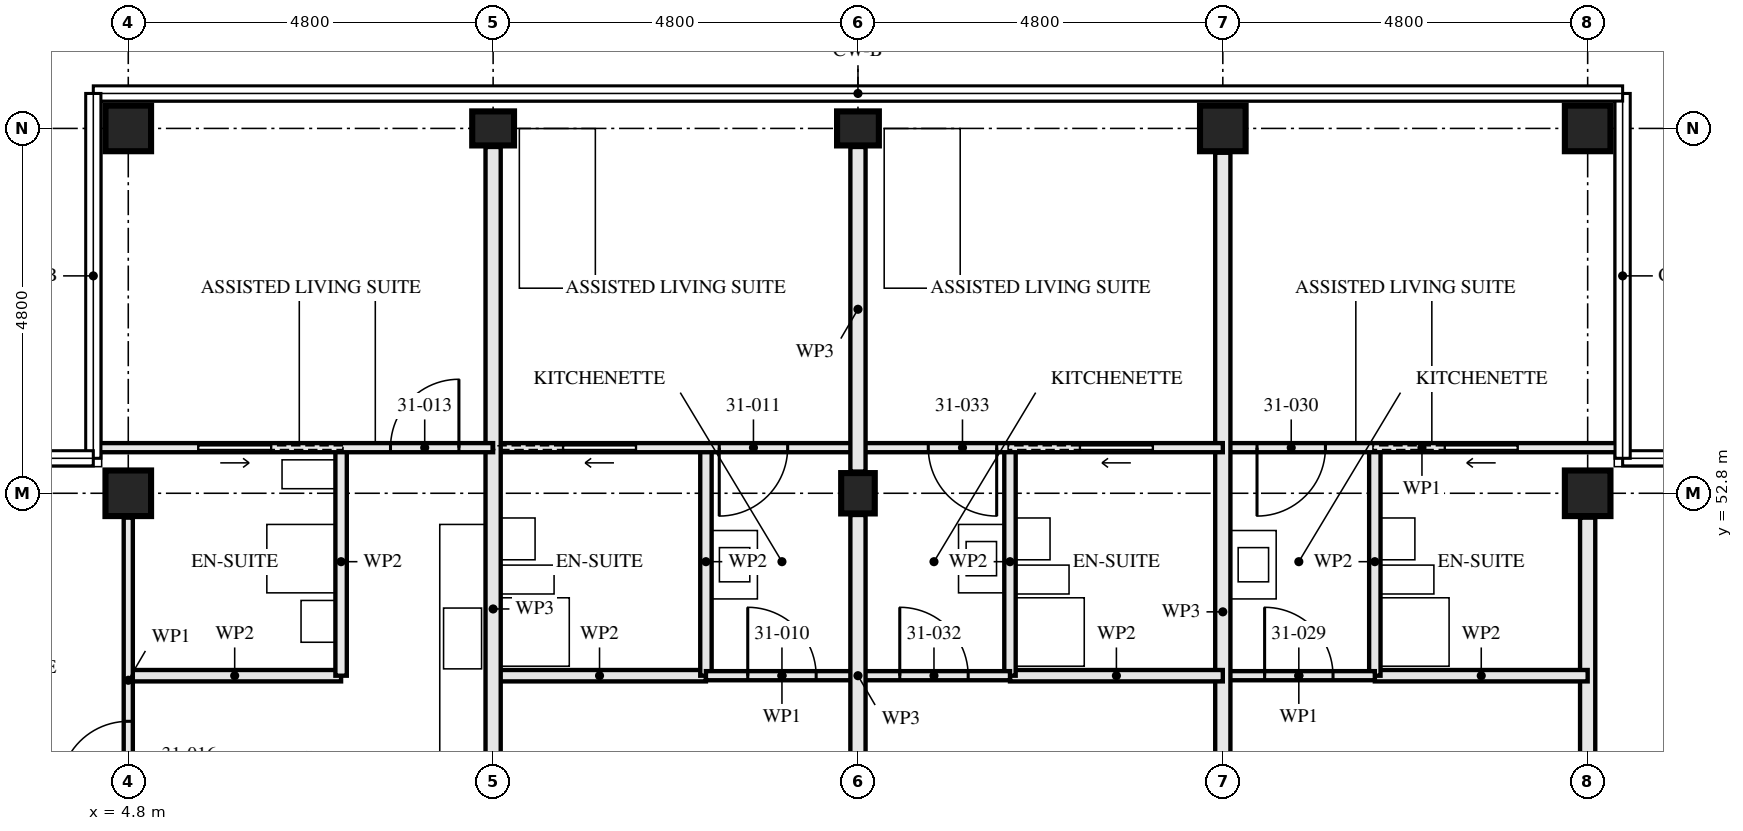
"""IFC4 building model, lengths in metres.
Left out: names, types, materials, properties, quantities, classifications, styles, units other than length and angle.
Written with IfcOpenShell. Run it as: python <this file> out.ifc"""

import sys

from ifc_helpers import new_model, si_unit, direction, frame, frame_2d, origin, origin_2d, place, context, subcontext, project, spatial, rectangle, hollow_rectangle, i_section, extrude, element, fill, save


model = new_model("IFC4")
c1 = context("Model", 3, precision=1e-05, world=origin(), true_north=direction((0.0, 1.0)))
c2 = subcontext(c1, "Body", "Model", "MODEL_VIEW")
j1 = project(units=[si_unit("LENGTHUNIT", "METRE"), si_unit("PLANEANGLEUNIT", "RADIAN")], contexts=[c1])
p1 = place(None, origin())
s1 = spatial("IfcSite", under=j1, at=p1, CompositionType="ELEMENT")
p2 = place(p1, origin())
s2 = spatial("IfcBuilding", under=s1, at=p2, CompositionType="ELEMENT")
p3 = place(p2, frame((0.0, 0.0, 115.5)))
s3 = spatial("IfcBuildingStorey", under=s2, at=p3, CompositionType="ELEMENT", Elevation=115.5)
for number, where, z_axis, x_axis in (
    (1, (4.8, 52.8, 0.0), (0.0, 0.0, 1.0), (0.0, 1.0, 0.0)),
    (2, (4.8, 57.6, 0.0), (0.0, 0.0, 1.0), (0.0, 1.0, 0.0)),
):
    element("IfcColumn", number, at=place(p3, frame(where, z_axis=z_axis, x_axis=x_axis)), inside=s3, PredefinedType="COLUMN", context=c2, shape_type="SweptSolid", body=[
        extrude(hollow_rectangle(XDim=0.6, YDim=0.6, WallThickness=0.05, at=origin_2d()), origin(), (0.0, 0.0, 1.0), 3.5),
    ])
p4 = place(p3, frame((9.6, 57.6, 0.0), z_axis=(0.0, 0.0, 1.0), x_axis=(0.0, 1.0, 0.0)))
e3 = element("IfcColumn", 3, at=p4, inside=s3, PredefinedType="COLUMN", context=c2, shape_type="SweptSolid", body=[
    extrude(i_section(OverallWidth=0.448, OverallDepth=0.55, WebThickness=0.072, FlangeThickness=0.115, FilletRadius=0.015, at=origin_2d()), origin(), (0.0, 0.0, 1.0), 3.5),
])
p5 = place(p3, frame((14.4, 52.8, 0.0), z_axis=(0.0, 0.0, 1.0), x_axis=(1.0, 0.0, 0.0)))
e4 = element("IfcColumn", 4, at=p5, inside=s3, PredefinedType="COLUMN", context=c2, shape_type="SweptSolid", body=[
    extrude(i_section(OverallWidth=0.442, OverallDepth=0.531, WebThickness=0.066, FlangeThickness=0.106, FilletRadius=0.015, at=origin_2d()), origin(), (0.0, 0.0, 1.0), 3.5),
])
p6 = place(p3, frame((14.4, 57.6, 0.0), z_axis=(0.0, 0.0, 1.0), x_axis=(0.0, 1.0, 0.0)))
e5 = element("IfcColumn", 5, at=p6, inside=s3, PredefinedType="COLUMN", context=c2, shape_type="SweptSolid", body=[
    extrude(i_section(OverallWidth=0.448, OverallDepth=0.55, WebThickness=0.072, FlangeThickness=0.115, FilletRadius=0.015, at=origin_2d()), origin(), (0.0, 0.0, 1.0), 3.5),
])
for number, where, z_axis, x_axis in (
    (6, (19.2, 57.6, 0.0), (0.0, 0.0, 1.0), (0.0, 1.0, 0.0)),
    (7, (24.0, 52.8, 0.0), (0.0, 0.0, 1.0), (0.0, 1.0, 0.0)),
    (8, (24.0, 57.6, 0.0), (0.0, 0.0, 1.0), (0.0, 1.0, 0.0)),
):
    element("IfcColumn", number, at=place(p3, frame(where, z_axis=z_axis, x_axis=x_axis)), inside=s3, PredefinedType="COLUMN", context=c2, shape_type="SweptSolid", body=[
        extrude(hollow_rectangle(XDim=0.6, YDim=0.6, WallThickness=0.06, at=origin_2d()), origin(), (0.0, 0.0, 1.0), 3.5),
    ])
p7 = place(p3, frame((12.4, 53.4, 0.0), z_axis=(0.0, 0.0, 1.0), x_axis=(0.0, -1.0, 0.0)))
e9 = element("IfcWall", 9, at=p7, inside=s3, PredefinedType="PARTITIONING", context=c2, shape_type="SweptSolid", body=[
    extrude(rectangle(XDim=3.0, YDim=0.15, at=frame_2d((1.5, 0.0))), origin(), (0.0, 0.0, 1.0), 2.55),
])
p8 = place(p3, frame((12.4, 50.4, 0.0), z_axis=(0.0, 0.0, 1.0), x_axis=(-1.0, 0.0, 0.0)))
e10 = element("IfcWall", 10, at=p8, inside=s3, PredefinedType="PARTITIONING", context=c2, shape_type="SweptSolid", body=[
    extrude(rectangle(XDim=2.8, YDim=0.15, at=frame_2d((1.4, 0.0))), origin(), (0.0, 0.0, 1.0), 3.33),
])
p9 = place(p3, frame((14.4, 50.4, 0.0), z_axis=(0.0, 0.0, 1.0), x_axis=(-1.0, 0.0, 0.0)))
e11 = element("IfcWall", 11, at=p9, inside=s3, PredefinedType="PARTITIONING", context=c2, shape_type="SweptSolid", body=[
    extrude(rectangle(XDim=2.0, YDim=0.12, at=frame_2d((1.0, 0.0))), origin(), (0.0, 0.0, 1.0), 3.33),
])
p10 = place(p9, frame((0.55, 0.0, 0.0)))
e12 = element("IfcOpeningElement", 12, at=p10, cuts=e11, PredefinedType="OPENING", context=c2, shape_type="SweptSolid", body=[
    extrude(rectangle(XDim=0.9, YDim=2.1, at=frame_2d((0.45, 1.05))), frame((0.0, 0.071, 0.0), z_axis=(0.0, -1.0, 0.0), x_axis=(1.0, 0.0, 0.0)), (0.0, 0.0, 1.0), 0.141),
])
p11 = place(p3, frame((14.4, 53.4, 0.0), z_axis=(0.0, 0.0, 1.0), x_axis=(-1.0, 0.0, 0.0)))
e13 = element("IfcWall", 13, at=p11, inside=s3, PredefinedType="PARTITIONING", context=c2, shape_type="SweptSolid", body=[
    extrude(rectangle(XDim=4.8, YDim=0.12, at=frame_2d((2.4, 0.0))), origin(), (0.0, 0.0, 1.0), 3.33),
])
p12 = place(p11, frame((0.925, 0.0, 0.0)))
e14 = element("IfcOpeningElement", 14, at=p12, cuts=e13, PredefinedType="OPENING", context=c2, shape_type="SweptSolid", body=[
    extrude(rectangle(XDim=0.9, YDim=2.1, at=frame_2d((0.45, 1.05))), frame((0.0, 0.071, 0.0), z_axis=(0.0, -1.0, 0.0), x_axis=(1.0, 0.0, 0.0)), (0.0, 0.0, 1.0), 0.141),
])
p13 = place(p11, frame((2.925, 0.0, 0.0)))
e15 = element("IfcOpeningElement", 15, at=p13, cuts=e13, PredefinedType="OPENING", context=c2, shape_type="SweptSolid", body=[
    extrude(rectangle(XDim=0.95, YDim=2.1, at=frame_2d((0.475, 1.05))), frame((0.0, 0.071, 0.0), z_axis=(0.0, -1.0, 0.0), x_axis=(1.0, 0.0, 0.0)), (0.0, 0.0, 1.0), 0.141),
])
p14 = place(p3, frame((9.6, 57.356, 0.0), z_axis=(0.0, 0.0, 1.0), x_axis=(0.0, -1.0, 0.0)))
e16 = element("IfcWall", 16, at=p14, inside=s3, PredefinedType="PARTITIONING", context=c2, shape_type="SweptSolid", body=[
    extrude(rectangle(XDim=12.156, YDim=0.2, at=frame_2d((6.078, 0.0))), origin(), (0.0, 0.0, 1.0), 2.55),
])
p15 = place(p3, frame((7.6, 53.4, 0.0), z_axis=(0.0, 0.0, 1.0), x_axis=(0.0, -1.0, 0.0)))
e17 = element("IfcWall", 17, at=p15, inside=s3, PredefinedType="PARTITIONING", context=c2, shape_type="SweptSolid", body=[
    extrude(rectangle(XDim=3.0, YDim=0.15, at=frame_2d((1.5, 0.0))), origin(), (0.0, 0.0, 1.0), 2.55),
])
p16 = place(p3, frame((7.6, 50.4, 0.0), z_axis=(0.0, 0.0, 1.0), x_axis=(-1.0, 0.0, 0.0)))
e18 = element("IfcWall", 18, at=p16, inside=s3, PredefinedType="PARTITIONING", context=c2, shape_type="SweptSolid", body=[
    extrude(rectangle(XDim=2.8, YDim=0.15, at=frame_2d((1.4, 0.0))), origin(), (0.0, 0.0, 1.0), 3.33),
])
p17 = place(p3, frame((9.6, 53.4, 0.0), z_axis=(0.0, 0.0, 1.0), x_axis=(-1.0, 0.0, 0.0)))
e19 = element("IfcWall", 19, at=p17, inside=s3, PredefinedType="PARTITIONING", context=c2, shape_type="SweptSolid", body=[
    extrude(rectangle(XDim=5.24, YDim=0.12, at=frame_2d((2.62, 0.0))), origin(), (0.0, 0.0, 1.0), 2.32),
])
p18 = place(p17, frame((0.45, 0.0, 0.0)))
e20 = element("IfcOpeningElement", 20, at=p18, cuts=e19, PredefinedType="OPENING", context=c2, shape_type="SweptSolid", body=[
    extrude(rectangle(XDim=0.9, YDim=2.1, at=frame_2d((0.45, 1.05))), frame((0.0, 0.071, 0.0), z_axis=(0.0, -1.0, 0.0), x_axis=(1.0, 0.0, 0.0)), (0.0, 0.0, 1.0), 0.141),
])
p19 = place(p17, frame((2.925, 0.0, 0.0)))
e21 = element("IfcOpeningElement", 21, at=p19, cuts=e19, PredefinedType="OPENING", context=c2, shape_type="SweptSolid", body=[
    extrude(rectangle(XDim=0.95, YDim=2.1, at=frame_2d((0.475, 1.05))), frame((0.0, 0.071, 0.0), z_axis=(0.0, -1.0, 0.0), x_axis=(1.0, 0.0, 0.0)), (0.0, 0.0, 1.0), 0.141),
])
p20 = place(p3, frame((4.8, 52.48, 0.0), z_axis=(0.0, 0.0, 1.0), x_axis=(0.0, -1.0, 0.0)))
e22 = element("IfcWall", 22, at=p20, inside=s3, PredefinedType="PARTITIONING", context=c2, shape_type="SweptSolid", body=[
    extrude(rectangle(XDim=4.28, YDim=0.12, at=frame_2d((2.14, 0.0))), origin(), (0.0, 0.0, 1.0), 3.33),
])
p21 = place(p20, frame((2.68, 0.0, 0.0)))
e23 = element("IfcOpeningElement", 23, at=p21, cuts=e22, PredefinedType="OPENING", context=c2, shape_type="SweptSolid", body=[
    extrude(rectangle(XDim=0.9, YDim=2.1, at=frame_2d((0.45, 1.05))), frame((0.0, 0.071, 0.0), z_axis=(0.0, -1.0, 0.0), x_axis=(1.0, 0.0, 0.0)), (0.0, 0.0, 1.0), 0.141),
])
p22 = place(p3, frame((24.0, 52.48, 0.0), z_axis=(0.0, 0.0, 1.0), x_axis=(0.0, -1.0, 0.0)))
e24 = element("IfcWall", 24, at=p22, inside=s3, PredefinedType="PARTITIONING", context=c2, shape_type="SweptSolid", body=[
    extrude(rectangle(XDim=7.28, YDim=0.2, at=frame_2d((3.64, 0.0))), origin(), (0.0, 0.0, 1.0), 2.55),
])
p23 = place(p3, frame((21.2, 53.4, 0.0), z_axis=(0.0, 0.0, 1.0), x_axis=(0.0, -1.0, 0.0)))
e25 = element("IfcWall", 25, at=p23, inside=s3, PredefinedType="PARTITIONING", context=c2, shape_type="SweptSolid", body=[
    extrude(rectangle(XDim=3.0, YDim=0.15, at=frame_2d((1.5, 0.0))), origin(), (0.0, 0.0, 1.0), 2.55),
])
p24 = place(p3, frame((24.0, 50.4, 0.0), z_axis=(0.0, 0.0, 1.0), x_axis=(-1.0, 0.0, 0.0)))
e26 = element("IfcWall", 26, at=p24, inside=s3, PredefinedType="PARTITIONING", context=c2, shape_type="SweptSolid", body=[
    extrude(rectangle(XDim=2.8, YDim=0.15, at=frame_2d((1.4, 0.0))), origin(), (0.0, 0.0, 1.0), 3.33),
])
p25 = place(p3, frame((21.2, 50.4, 0.0), z_axis=(0.0, 0.0, 1.0), x_axis=(-1.0, 0.0, 0.0)))
e27 = element("IfcWall", 27, at=p25, inside=s3, PredefinedType="PARTITIONING", context=c2, shape_type="SweptSolid", body=[
    extrude(rectangle(XDim=2.0, YDim=0.12, at=frame_2d((1.0, 0.0))), origin(), (0.0, 0.0, 1.0), 3.33),
])
p26 = place(p25, frame((0.55, 0.0, 0.0)))
e28 = element("IfcOpeningElement", 28, at=p26, cuts=e27, PredefinedType="OPENING", context=c2, shape_type="SweptSolid", body=[
    extrude(rectangle(XDim=0.9, YDim=2.1, at=frame_2d((0.45, 1.05))), frame((0.0, 0.071, 0.0), z_axis=(0.0, -1.0, 0.0), x_axis=(1.0, 0.0, 0.0)), (0.0, 0.0, 1.0), 0.141),
])
p27 = place(p3, frame((24.44, 53.4, 0.0), z_axis=(0.0, 0.0, 1.0), x_axis=(-1.0, 0.0, 0.0)))
e29 = element("IfcWall", 29, at=p27, inside=s3, PredefinedType="PARTITIONING", context=c2, shape_type="SweptSolid", body=[
    extrude(rectangle(XDim=5.24, YDim=0.12, at=frame_2d((2.62, 0.0))), origin(), (0.0, 0.0, 1.0), 2.32),
])
p28 = place(p27, frame((3.89, 0.0, 0.0)))
e30 = element("IfcOpeningElement", 30, at=p28, cuts=e29, PredefinedType="OPENING", context=c2, shape_type="SweptSolid", body=[
    extrude(rectangle(XDim=0.9, YDim=2.1, at=frame_2d((0.45, 1.05))), frame((0.0, 0.071, 0.0), z_axis=(0.0, -1.0, 0.0), x_axis=(1.0, 0.0, 0.0)), (0.0, 0.0, 1.0), 0.141),
])
p29 = place(p27, frame((1.365, 0.0, 0.0)))
e31 = element("IfcOpeningElement", 31, at=p29, cuts=e29, PredefinedType="OPENING", context=c2, shape_type="SweptSolid", body=[
    extrude(rectangle(XDim=0.95, YDim=2.1, at=frame_2d((0.475, 1.05))), frame((0.0, 0.071, 0.0), z_axis=(0.0, -1.0, 0.0), x_axis=(1.0, 0.0, 0.0)), (0.0, 0.0, 1.0), 0.141),
])
p30 = place(p3, frame((19.2, 57.28, 0.0), z_axis=(0.0, 0.0, 1.0), x_axis=(0.0, -1.0, 0.0)))
e32 = element("IfcWall", 32, at=p30, inside=s3, PredefinedType="PARTITIONING", context=c2, shape_type="SweptSolid", body=[
    extrude(rectangle(XDim=12.08, YDim=0.2, at=frame_2d((6.04, 0.0))), origin(), (0.0, 0.0, 1.0), 2.55),
])
p31 = place(p3, frame((16.4, 53.4, 0.0), z_axis=(0.0, 0.0, 1.0), x_axis=(0.0, -1.0, 0.0)))
e33 = element("IfcWall", 33, at=p31, inside=s3, PredefinedType="PARTITIONING", context=c2, shape_type="SweptSolid", body=[
    extrude(rectangle(XDim=3.0, YDim=0.15, at=frame_2d((1.5, 0.0))), origin(), (0.0, 0.0, 1.0), 2.55),
])
p32 = place(p3, frame((19.2, 50.4, 0.0), z_axis=(0.0, 0.0, 1.0), x_axis=(-1.0, 0.0, 0.0)))
e34 = element("IfcWall", 34, at=p32, inside=s3, PredefinedType="PARTITIONING", context=c2, shape_type="SweptSolid", body=[
    extrude(rectangle(XDim=2.8, YDim=0.15, at=frame_2d((1.4, 0.0))), origin(), (0.0, 0.0, 1.0), 3.33),
])
p33 = place(p3, frame((16.4, 50.4, 0.0), z_axis=(0.0, 0.0, 1.0), x_axis=(-1.0, 0.0, 0.0)))
e35 = element("IfcWall", 35, at=p33, inside=s3, PredefinedType="PARTITIONING", context=c2, shape_type="SweptSolid", body=[
    extrude(rectangle(XDim=2.0, YDim=0.12, at=frame_2d((1.0, 0.0))), origin(), (0.0, 0.0, 1.0), 3.33),
])
p34 = place(p33, frame((0.55, 0.0, 0.0)))
e36 = element("IfcOpeningElement", 36, at=p34, cuts=e35, PredefinedType="OPENING", context=c2, shape_type="SweptSolid", body=[
    extrude(rectangle(XDim=0.9, YDim=2.1, at=frame_2d((0.45, 1.05))), frame((0.0, 0.071, 0.0), z_axis=(0.0, -1.0, 0.0), x_axis=(1.0, 0.0, 0.0)), (0.0, 0.0, 1.0), 0.141),
])
p35 = place(p3, frame((19.2, 53.4, 0.0), z_axis=(0.0, 0.0, 1.0), x_axis=(-1.0, 0.0, 0.0)))
e37 = element("IfcWall", 37, at=p35, inside=s3, PredefinedType="PARTITIONING", context=c2, shape_type="SweptSolid", body=[
    extrude(rectangle(XDim=4.8, YDim=0.12, at=frame_2d((2.4, 0.0))), origin(), (0.0, 0.0, 1.0), 3.33),
])
p36 = place(p35, frame((2.975, 0.0, 0.0)))
e38 = element("IfcOpeningElement", 38, at=p36, cuts=e37, PredefinedType="OPENING", context=c2, shape_type="SweptSolid", body=[
    extrude(rectangle(XDim=0.9, YDim=2.1, at=frame_2d((0.45, 1.05))), frame((0.0, 0.071, 0.0), z_axis=(0.0, -1.0, 0.0), x_axis=(1.0, 0.0, 0.0)), (0.0, 0.0, 1.0), 0.141),
])
p37 = place(p35, frame((0.925, 0.0, 0.0)))
e39 = element("IfcOpeningElement", 39, at=p37, cuts=e37, PredefinedType="OPENING", context=c2, shape_type="SweptSolid", body=[
    extrude(rectangle(XDim=0.95, YDim=2.1, at=frame_2d((0.475, 1.05))), frame((0.0, 0.071, 0.0), z_axis=(0.0, -1.0, 0.0), x_axis=(1.0, 0.0, 0.0)), (0.0, 0.0, 1.0), 0.141),
])
p38 = place(p3, frame((14.4, 48.285, 0.0), z_axis=(0.0, 0.0, 1.0), x_axis=(0.0, 1.0, 0.0)))
e40 = element("IfcWall", 40, at=p38, inside=s3, PredefinedType="PARTITIONING", context=c2, shape_type="SweptSolid", body=[
    extrude(rectangle(XDim=4.229, YDim=0.2, at=frame_2d((2.115, 0.0))), origin(), (0.0, 0.0, 1.0), 2.32),
])
p39 = place(p3, frame((14.4, 53.085, 0.0), z_axis=(0.0, 0.0, 1.0), x_axis=(0.0, 1.0, 0.0)))
e41 = element("IfcWall", 41, at=p39, inside=s3, PredefinedType="PARTITIONING", context=c2, shape_type="SweptSolid", body=[
    extrude(rectangle(XDim=4.271, YDim=0.2, at=frame_2d((2.135, 0.0))), origin(), (0.0, 0.0, 1.0), 2.32),
])
p40 = place(p10, frame((0.9, 0.0, 0.0), z_axis=(0.0, 0.0, 1.0), x_axis=(-1.0, 0.0, 0.0)))
e42 = element("IfcDoor", 42, at=p40, inside=s3, OperationType="SINGLE_SWING_RIGHT", PredefinedType="DOOR", context=c2, shape_type="SweptSolid", body=[
    extrude(rectangle(XDim=0.9, YDim=2.1, at=frame_2d((0.45, 1.05))), frame((0.0, 0.022, 0.0), z_axis=(0.0, -1.0, 0.0), x_axis=(1.0, 0.0, 0.0)), (0.0, 0.0, 1.0), 0.044),
])
fill(e12, e42)
p41 = place(p12, origin())
e43 = element("IfcDoor", 43, at=p41, inside=s3, OperationType="SINGLE_SWING_LEFT", PredefinedType="DOOR", context=c2, shape_type="SweptSolid", body=[
    extrude(rectangle(XDim=0.9, YDim=2.1, at=frame_2d((0.45, 1.05))), frame((0.0, 0.022, 0.0), z_axis=(0.0, -1.0, 0.0), x_axis=(1.0, 0.0, 0.0)), (0.0, 0.0, 1.0), 0.044),
])
fill(e14, e43)
p42 = place(p13, origin())
e44 = element("IfcDoor", 44, at=p42, inside=s3, OperationType="SLIDING_TO_LEFT", PredefinedType="DOOR", context=c2, shape_type="SweptSolid", body=[
    extrude(rectangle(XDim=0.95, YDim=2.1, at=frame_2d((0.475, 1.05))), frame((0.0, 0.022, 0.0), z_axis=(0.0, -1.0, 0.0), x_axis=(1.0, 0.0, 0.0)), (0.0, 0.0, 1.0), 0.044),
])
fill(e15, e44)
p43 = place(p18, frame((0.9, 0.0, 0.0), z_axis=(0.0, 0.0, 1.0), x_axis=(-1.0, 0.0, 0.0)))
e45 = element("IfcDoor", 45, at=p43, inside=s3, OperationType="SINGLE_SWING_LEFT", PredefinedType="DOOR", context=c2, shape_type="SweptSolid", body=[
    extrude(rectangle(XDim=0.9, YDim=2.1, at=frame_2d((0.45, 1.05))), frame((0.0, 0.022, 0.0), z_axis=(0.0, -1.0, 0.0), x_axis=(1.0, 0.0, 0.0)), (0.0, 0.0, 1.0), 0.044),
])
fill(e20, e45)
p44 = place(p19, origin())
e46 = element("IfcDoor", 46, at=p44, inside=s3, OperationType="SLIDING_TO_RIGHT", PredefinedType="DOOR", context=c2, shape_type="SweptSolid", body=[
    extrude(rectangle(XDim=0.95, YDim=2.1, at=frame_2d((0.475, 1.05))), frame((0.0, 0.022, 0.0), z_axis=(0.0, -1.0, 0.0), x_axis=(1.0, 0.0, 0.0)), (0.0, 0.0, 1.0), 0.044),
])
fill(e21, e46)
p45 = place(p21, frame((0.9, 0.0, 0.0), z_axis=(0.0, 0.0, 1.0), x_axis=(-1.0, 0.0, 0.0)))
e47 = element("IfcDoor", 47, at=p45, inside=s3, OperationType="SINGLE_SWING_RIGHT", PredefinedType="DOOR", context=c2, shape_type="SweptSolid", body=[
    extrude(rectangle(XDim=0.9, YDim=2.1, at=frame_2d((0.45, 1.05))), frame((0.0, 0.022, 0.0), z_axis=(0.0, -1.0, 0.0), x_axis=(1.0, 0.0, 0.0)), (0.0, 0.0, 1.0), 0.044),
])
fill(e23, e47)
p46 = place(p26, frame((0.9, 0.0, 0.0), z_axis=(0.0, 0.0, 1.0), x_axis=(-1.0, 0.0, 0.0)))
e48 = element("IfcDoor", 48, at=p46, inside=s3, OperationType="SINGLE_SWING_RIGHT", PredefinedType="DOOR", context=c2, shape_type="SweptSolid", body=[
    extrude(rectangle(XDim=0.9, YDim=2.1, at=frame_2d((0.45, 1.05))), frame((0.0, 0.022, 0.0), z_axis=(0.0, -1.0, 0.0), x_axis=(1.0, 0.0, 0.0)), (0.0, 0.0, 1.0), 0.044),
])
fill(e28, e48)
p47 = place(p28, origin())
e49 = element("IfcDoor", 49, at=p47, inside=s3, OperationType="SINGLE_SWING_LEFT", PredefinedType="DOOR", context=c2, shape_type="SweptSolid", body=[
    extrude(rectangle(XDim=0.9, YDim=2.1, at=frame_2d((0.45, 1.05))), frame((0.0, 0.022, 0.0), z_axis=(0.0, -1.0, 0.0), x_axis=(1.0, 0.0, 0.0)), (0.0, 0.0, 1.0), 0.044),
])
fill(e30, e49)
p48 = place(p29, origin())
e50 = element("IfcDoor", 50, at=p48, inside=s3, OperationType="SLIDING_TO_LEFT", PredefinedType="DOOR", context=c2, shape_type="SweptSolid", body=[
    extrude(rectangle(XDim=0.95, YDim=2.1, at=frame_2d((0.475, 1.05))), frame((0.0, 0.022, 0.0), z_axis=(0.0, -1.0, 0.0), x_axis=(1.0, 0.0, 0.0)), (0.0, 0.0, 1.0), 0.044),
])
fill(e31, e50)
p49 = place(p34, frame((0.9, 0.0, 0.0), z_axis=(0.0, 0.0, 1.0), x_axis=(-1.0, 0.0, 0.0)))
e51 = element("IfcDoor", 51, at=p49, inside=s3, OperationType="SINGLE_SWING_RIGHT", PredefinedType="DOOR", context=c2, shape_type="SweptSolid", body=[
    extrude(rectangle(XDim=0.9, YDim=2.1, at=frame_2d((0.45, 1.05))), frame((0.0, 0.022, 0.0), z_axis=(0.0, -1.0, 0.0), x_axis=(1.0, 0.0, 0.0)), (0.0, 0.0, 1.0), 0.044),
])
fill(e36, e51)
p50 = place(p36, origin())
e52 = element("IfcDoor", 52, at=p50, inside=s3, OperationType="SINGLE_SWING_RIGHT", PredefinedType="DOOR", context=c2, shape_type="SweptSolid", body=[
    extrude(rectangle(XDim=0.9, YDim=2.1, at=frame_2d((0.45, 1.05))), frame((0.0, 0.022, 0.0), z_axis=(0.0, -1.0, 0.0), x_axis=(1.0, 0.0, 0.0)), (0.0, 0.0, 1.0), 0.044),
])
fill(e38, e52)
p51 = place(p37, origin())
e53 = element("IfcDoor", 53, at=p51, inside=s3, OperationType="SLIDING_TO_LEFT", PredefinedType="DOOR", context=c2, shape_type="SweptSolid", body=[
    extrude(rectangle(XDim=0.95, YDim=2.1, at=frame_2d((0.475, 1.05))), frame((0.0, 0.022, 0.0), z_axis=(0.0, -1.0, 0.0), x_axis=(1.0, 0.0, 0.0)), (0.0, 0.0, 1.0), 0.044),
])
fill(e39, e53)
save(model, sys.argv[1])
